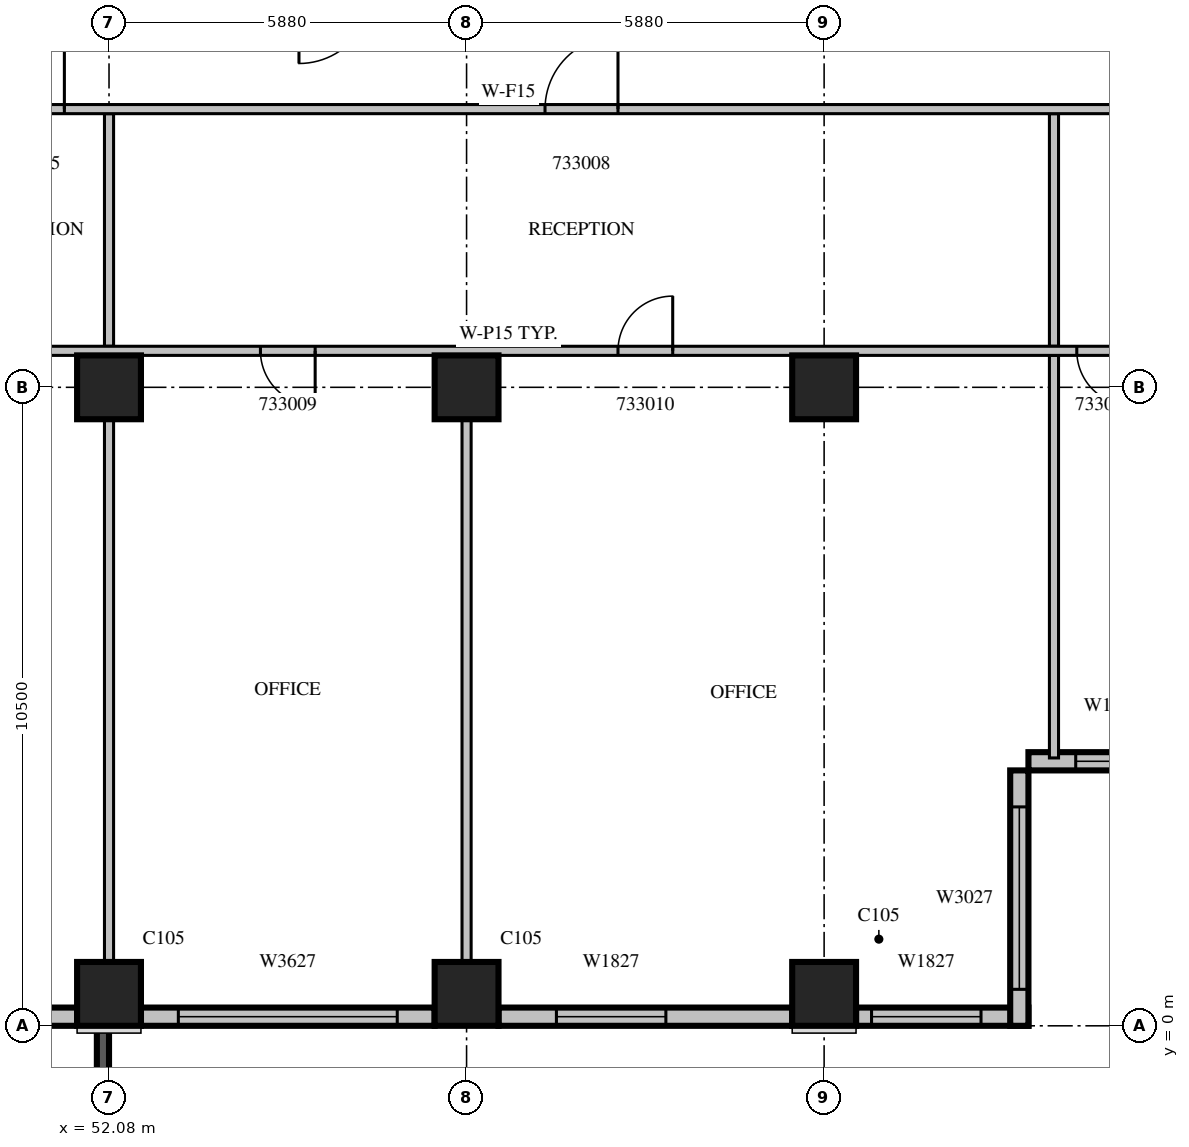
"""IFC4 building model, lengths in metres.
Left out: names, types, materials, properties, quantities, classifications, styles, units other than length and angle.
Written with IfcOpenShell. Run it as: python <this file> out.ifc"""

import sys

from ifc_helpers import new_model, si_unit, direction, frame, frame_2d, origin, origin_2d, place, context, subcontext, project, spatial, rectangle, extrude, source, transform, mapped, element, fill, save


model = new_model("IFC4")
c1 = context("Model", 3, precision=1e-05, world=origin(), true_north=direction((0.0, 1.0)))
c2 = subcontext(c1, "Body", "Model", "MODEL_VIEW")
j1 = project(units=[si_unit("LENGTHUNIT", "METRE"), si_unit("PLANEANGLEUNIT", "RADIAN")], contexts=[c1])
p1 = place(None, origin())
s1 = spatial("IfcSite", under=j1, at=p1, CompositionType="ELEMENT")
p2 = place(p1, origin())
s2 = spatial("IfcBuilding", under=s1, at=p2, CompositionType="ELEMENT")
p3 = place(p2, frame((0.0, 0.0, 149.7)))
s3 = spatial("IfcBuildingStorey", under=s2, at=p3, CompositionType="ELEMENT", Elevation=149.7)
m1 = source(origin(), c2, "Body", "SweptSolid", [
    extrude(rectangle(XDim=1.05, YDim=1.05, at=origin_2d()), origin(), (0.0, 0.0, 1.0), 4.2),
])
for number, where, z_axis, x_axis in (
    (1, (52.08, 0.525, 0.0), (0.0, 0.0, 1.0), (1.0, 0.0, 0.0)),
    (2, (57.96, 0.525, 0.0), (0.0, 0.0, 1.0), (1.0, 0.0, 0.0)),
    (3, (63.84, 0.525, 0.0), (0.0, 0.0, 1.0), (1.0, 0.0, 0.0)),
    (4, (52.08, 10.5, 0.0), (0.0, 0.0, 1.0), (1.0, 0.0, 0.0)),
    (5, (57.96, 10.5, 0.0), (0.0, 0.0, 1.0), (1.0, 0.0, 0.0)),
    (6, (63.84, 10.5, 0.0), (0.0, 0.0, 1.0), (1.0, 0.0, 0.0)),
):
    element("IfcColumn", number, at=place(p3, frame(where, z_axis=z_axis, x_axis=x_axis)), inside=s3, PredefinedType="COLUMN", context=c2, shape_type="MappedRepresentation", body=[
        mapped(m1, transform((0.0, 0.0, 0.0), scale=1.0)),
    ])
m2 = source(origin(), c2, "Body", "SweptSolid", [
    extrude(rectangle(XDim=3.9, YDim=0.2, at=frame_2d((1.95, 0.0))), origin(), (0.0, 0.0, 1.0), 3.8),
])
p4 = place(p3, frame((51.98, 0.0, 0.0), z_axis=(0.0, 0.0, 1.0), x_axis=(0.0, -1.0, 0.0)))
e7 = element("IfcWall", 7, at=p4, inside=s3, PredefinedType="SOLIDWALL", context=c2, shape_type="MappedRepresentation", body=[
    mapped(m2, transform((0.0, 0.0, 0.0), scale=1.0)),
])
m3 = source(origin(), c2, "Body", "SweptSolid", [
    extrude(rectangle(XDim=2.4, YDim=2.7, at=frame_2d((1.2, 1.35))), frame((0.0, 0.11, 0.0), z_axis=(0.0, -1.0, 0.0), x_axis=(1.0, 0.0, 0.0)), (0.0, 0.0, 1.0), 0.22),
])
p5 = place(p4, frame((0.75, 0.0, 0.6)))
e8 = element("IfcOpeningElement", 8, at=p5, cuts=e7, PredefinedType="OPENING", context=c2, shape_type="MappedRepresentation", body=[
    mapped(m3, transform((0.0, 0.0, 0.0), scale=1.0)),
])
m4 = source(origin(), c2, "Body", "SweptSolid", [
    extrude(rectangle(XDim=4.83, YDim=0.3, at=frame_2d((2.415, 0.0))), origin(), (0.0, 0.0, 1.0), 3.8),
])
p6 = place(p3, frame((46.725, 0.15, 0.0), z_axis=(0.0, 0.0, 1.0), x_axis=(1.0, 0.0, 0.0)))
e9 = element("IfcWall", 9, at=p6, inside=s3, PredefinedType="STANDARD", context=c2, shape_type="MappedRepresentation", body=[
    mapped(m4, transform((0.0, 0.0, 0.0), scale=1.0)),
])
m5 = source(origin(), c2, "Body", "SweptSolid", [
    extrude(rectangle(XDim=1.0, YDim=2.1, at=frame_2d((0.5, 1.05))), frame((0.0, 0.16, 0.0), z_axis=(0.0, -1.0, 0.0), x_axis=(1.0, 0.0, 0.0)), (0.0, 0.0, 1.0), 0.32),
])
p7 = place(p6, frame((1.915, 0.0, 0.0)))
e10 = element("IfcOpeningElement", 10, at=p7, cuts=e9, PredefinedType="OPENING", context=c2, shape_type="MappedRepresentation", body=[
    mapped(m5, transform((0.0, 0.0, 0.0), scale=1.0)),
])
p8 = place(p3, frame((52.605, 0.15, 0.0), z_axis=(0.0, 0.0, 1.0), x_axis=(1.0, 0.0, 0.0)))
e11 = element("IfcWall", 11, at=p8, inside=s3, PredefinedType="STANDARD", context=c2, shape_type="MappedRepresentation", body=[
    mapped(m4, transform((0.0, 0.0, 0.0), scale=1.0)),
])
m6 = source(origin(), c2, "Body", "SweptSolid", [
    extrude(rectangle(XDim=3.6, YDim=2.7, at=frame_2d((1.8, 1.35))), frame((0.0, 0.16, 0.0), z_axis=(0.0, -1.0, 0.0), x_axis=(1.0, 0.0, 0.0)), (0.0, 0.0, 1.0), 0.32),
])
p9 = place(p8, frame((0.615, 0.0, 0.6)))
e12 = element("IfcOpeningElement", 12, at=p9, cuts=e11, PredefinedType="OPENING", context=c2, shape_type="MappedRepresentation", body=[
    mapped(m6, transform((0.0, 0.0, 0.0), scale=1.0)),
])
p10 = place(p3, frame((58.485, 0.15, 0.0), z_axis=(0.0, 0.0, 1.0), x_axis=(1.0, 0.0, 0.0)))
e13 = element("IfcWall", 13, at=p10, inside=s3, PredefinedType="STANDARD", context=c2, shape_type="MappedRepresentation", body=[
    mapped(m4, transform((0.0, 0.0, 0.0), scale=1.0)),
])
m7 = source(origin(), c2, "Body", "SweptSolid", [
    extrude(rectangle(XDim=1.8, YDim=2.7, at=frame_2d((0.9, 1.35))), frame((0.0, 0.16, 0.0), z_axis=(0.0, -1.0, 0.0), x_axis=(1.0, 0.0, 0.0)), (0.0, 0.0, 1.0), 0.32),
])
p11 = place(p10, frame((0.953, 0.0, 0.6)))
e14 = element("IfcOpeningElement", 14, at=p11, cuts=e13, PredefinedType="OPENING", context=c2, shape_type="MappedRepresentation", body=[
    mapped(m7, transform((0.0, 0.0, 0.0), scale=1.0)),
])
m8 = source(origin(), c2, "Body", "SweptSolid", [
    extrude(rectangle(XDim=2.835, YDim=0.3, at=frame_2d((1.417, 0.0))), origin(), (0.0, 0.0, 1.0), 3.8),
])
p12 = place(p3, frame((64.365, 0.15, 0.0), z_axis=(0.0, 0.0, 1.0), x_axis=(1.0, 0.0, 0.0)))
e15 = element("IfcWall", 15, at=p12, inside=s3, PredefinedType="STANDARD", context=c2, shape_type="MappedRepresentation", body=[
    mapped(m8, transform((0.0, 0.0, 0.0), scale=1.0)),
])
p13 = place(p12, frame((0.255, 0.0, 0.6)))
e16 = element("IfcOpeningElement", 16, at=p13, cuts=e15, PredefinedType="OPENING", context=c2, shape_type="MappedRepresentation", body=[
    mapped(m7, transform((0.0, 0.0, 0.0), scale=1.0)),
])
m9 = source(origin(), c2, "Body", "SweptSolid", [
    extrude(rectangle(XDim=4.2, YDim=0.3, at=frame_2d((2.1, 0.0))), origin(), (0.0, 0.0, 1.0), 3.8),
])
p14 = place(p3, frame((67.05, 0.0, 0.0), z_axis=(0.0, 0.0, 1.0), x_axis=(0.0, 1.0, 0.0)))
e17 = element("IfcWall", 17, at=p14, inside=s3, PredefinedType="STANDARD", context=c2, shape_type="MappedRepresentation", body=[
    mapped(m9, transform((0.0, 0.0, 0.0), scale=1.0)),
])
m10 = source(origin(), c2, "Body", "SweptSolid", [
    extrude(rectangle(XDim=3.0, YDim=2.7, at=frame_2d((1.5, 1.35))), frame((0.0, 0.16, 0.0), z_axis=(0.0, -1.0, 0.0), x_axis=(1.0, 0.0, 0.0)), (0.0, 0.0, 1.0), 0.32),
])
p15 = place(p14, frame((0.6, 0.0, 0.6)))
e18 = element("IfcOpeningElement", 18, at=p15, cuts=e17, PredefinedType="OPENING", context=c2, shape_type="MappedRepresentation", body=[
    mapped(m10, transform((0.0, 0.0, 0.0), scale=1.0)),
])
m11 = source(origin(), c2, "Body", "SweptSolid", [
    extrude(rectangle(XDim=2.52, YDim=0.3, at=frame_2d((1.26, 0.0))), origin(), (0.0, 0.0, 1.0), 3.8),
])
p16 = place(p3, frame((67.2, 4.35, 0.0), z_axis=(0.0, 0.0, 1.0), x_axis=(1.0, 0.0, 0.0)))
e19 = element("IfcWall", 19, at=p16, inside=s3, PredefinedType="STANDARD", context=c2, shape_type="MappedRepresentation", body=[
    mapped(m11, transform((0.0, 0.0, 0.0), scale=1.0)),
])
m12 = source(origin(), c2, "Body", "SweptSolid", [
    extrude(rectangle(XDim=1.2, YDim=2.7, at=frame_2d((0.6, 1.35))), frame((0.0, 0.16, 0.0), z_axis=(0.0, -1.0, 0.0), x_axis=(1.0, 0.0, 0.0)), (0.0, 0.0, 1.0), 0.32),
])
p17 = place(p16, frame((0.777, 0.0, 0.6)))
e20 = element("IfcOpeningElement", 20, at=p17, cuts=e19, PredefinedType="OPENING", context=c2, shape_type="MappedRepresentation", body=[
    mapped(m12, transform((0.0, 0.0, 0.0), scale=1.0)),
])
m13 = source(origin(), c2, "Body", "SweptSolid", [
    extrude(rectangle(XDim=8.927, YDim=0.15, at=frame_2d((4.463, 0.0))), origin(), (0.0, 0.0, 1.0), 3.8),
])
for number, where, z_axis, x_axis in (
    (21, (57.96, 1.049, 0.0), (0.0, 0.0, 1.0), (0.0, 1.0, 0.0)),
    (22, (52.08, 1.049, 0.0), (0.0, 0.0, 1.0), (0.0, 1.0, 0.0)),
):
    element("IfcWall", number, at=place(p3, frame(where, z_axis=z_axis, x_axis=x_axis)), inside=s3, PredefinedType="PARTITIONING", context=c2, shape_type="MappedRepresentation", body=[
        mapped(m13, transform((0.0, 0.0, 0.0), scale=1.0)),
    ])
m14 = source(origin(), c2, "Body", "SweptSolid", [
    extrude(rectangle(XDim=3.825, YDim=0.15, at=frame_2d((1.913, 0.0))), origin(), (0.0, 0.0, 1.0), 3.8),
])
p18 = place(p3, frame((52.08, 11.175, 0.0), z_axis=(0.0, 0.0, 1.0), x_axis=(0.0, 1.0, 0.0)))
e23 = element("IfcWall", 23, at=p18, inside=s3, PredefinedType="PARTITIONING", context=c2, shape_type="MappedRepresentation", body=[
    mapped(m14, transform((0.0, 0.0, 0.0), scale=1.0)),
])
m15 = source(origin(), c2, "Body", "SweptSolid", [
    extrude(rectangle(XDim=6.62, YDim=0.15, at=frame_2d((3.31, 0.0))), origin(), (0.0, 0.0, 1.0), 3.8),
])
p19 = place(p3, frame((67.62, 4.405, 0.0), z_axis=(0.0, 0.0, 1.0), x_axis=(0.0, 1.0, 0.0)))
e24 = element("IfcWall", 24, at=p19, inside=s3, PredefinedType="PARTITIONING", context=c2, shape_type="MappedRepresentation", body=[
    mapped(m15, transform((0.0, 0.0, 0.0), scale=1.0)),
])
p20 = place(p3, frame((67.62, 11.175, 0.0), z_axis=(0.0, 0.0, 1.0), x_axis=(0.0, 1.0, 0.0)))
e25 = element("IfcWall", 25, at=p20, inside=s3, PredefinedType="PARTITIONING", context=c2, shape_type="MappedRepresentation", body=[
    mapped(m14, transform((0.0, 0.0, 0.0), scale=1.0)),
])
m16 = source(origin(), c2, "Body", "SweptSolid", [
    extrude(rectangle(XDim=24.9, YDim=0.15, at=frame_2d((12.45, 0.0))), origin(), (0.0, 0.0, 1.0), 3.8),
])
p21 = place(p3, frame((71.1, 11.1, 0.0), z_axis=(0.0, 0.0, 1.0), x_axis=(-1.0, 0.0, 0.0)))
e26 = element("IfcWall", 26, at=p21, inside=s3, PredefinedType="PARTITIONING", context=c2, shape_type="MappedRepresentation", body=[
    mapped(m16, transform((0.0, 0.0, 0.0), scale=1.0)),
])
m17 = source(origin(), c2, "Body", "SweptSolid", [
    extrude(rectangle(XDim=1.1, YDim=2.1, at=frame_2d((0.55, 1.05))), frame((0.0, 0.085, 0.0), z_axis=(0.0, -1.0, 0.0), x_axis=(1.0, 0.0, 0.0)), (0.0, 0.0, 1.0), 0.17),
])
p22 = place(p21, frame((19.988, 0.0, 0.0)))
e27 = element("IfcOpeningElement", 27, at=p22, cuts=e26, PredefinedType="OPENING", context=c2, shape_type="MappedRepresentation", body=[
    mapped(m17, transform((0.0, 0.0, 0.0), scale=1.0)),
])
m18 = source(origin(), c2, "Body", "SweptSolid", [
    extrude(rectangle(XDim=0.9, YDim=2.1, at=frame_2d((0.45, 1.05))), frame((0.0, 0.085, 0.0), z_axis=(0.0, -1.0, 0.0), x_axis=(1.0, 0.0, 0.0)), (0.0, 0.0, 1.0), 0.17),
])
p23 = place(p21, frame((15.63, 0.0, 0.0)))
e28 = element("IfcOpeningElement", 28, at=p23, cuts=e26, PredefinedType="OPENING", context=c2, shape_type="MappedRepresentation", body=[
    mapped(m18, transform((0.0, 0.0, 0.0), scale=1.0)),
])
p24 = place(p21, frame((9.75, 0.0, 0.0)))
e29 = element("IfcOpeningElement", 29, at=p24, cuts=e26, PredefinedType="OPENING", context=c2, shape_type="MappedRepresentation", body=[
    mapped(m18, transform((0.0, 0.0, 0.0), scale=1.0)),
])
p25 = place(p21, frame((2.205, 0.0, 0.0)))
e30 = element("IfcOpeningElement", 30, at=p25, cuts=e26, PredefinedType="OPENING", context=c2, shape_type="MappedRepresentation", body=[
    mapped(m18, transform((0.0, 0.0, 0.0), scale=1.0)),
])
p26 = place(p3, frame((71.1, 15.075, 0.0), z_axis=(0.0, 0.0, 1.0), x_axis=(-1.0, 0.0, 0.0)))
e31 = element("IfcWall", 31, at=p26, inside=s3, PredefinedType="PARTITIONING", context=c2, shape_type="MappedRepresentation", body=[
    mapped(m16, transform((0.0, 0.0, 0.0), scale=1.0)),
])
p27 = place(p26, frame((19.754, 0.0, 0.0)))
e32 = element("IfcOpeningElement", 32, at=p27, cuts=e31, PredefinedType="OPENING", context=c2, shape_type="MappedRepresentation", body=[
    mapped(m17, transform((0.0, 0.0, 0.0), scale=1.0)),
])
p28 = place(p26, frame((22.794, 0.0, 0.0)))
e33 = element("IfcOpeningElement", 33, at=p28, cuts=e31, PredefinedType="OPENING", context=c2, shape_type="MappedRepresentation", body=[
    mapped(m18, transform((0.0, 0.0, 0.0), scale=1.0)),
])
m19 = source(origin(), c2, "Body", "SweptSolid", [
    extrude(rectangle(XDim=1.2, YDim=2.1, at=frame_2d((0.6, 1.05))), frame((0.0, 0.085, 0.0), z_axis=(0.0, -1.0, 0.0), x_axis=(1.0, 0.0, 0.0)), (0.0, 0.0, 1.0), 0.17),
])
p29 = place(p26, frame((10.65, 0.0, 0.0)))
e34 = element("IfcOpeningElement", 34, at=p29, cuts=e31, PredefinedType="OPENING", context=c2, shape_type="MappedRepresentation", body=[
    mapped(m19, transform((0.0, 0.0, 0.0), scale=1.0)),
])
p30 = place(p26, frame((1.103, 0.0, 0.0)))
e35 = element("IfcOpeningElement", 35, at=p30, cuts=e31, PredefinedType="OPENING", context=c2, shape_type="MappedRepresentation", body=[
    mapped(m19, transform((0.0, 0.0, 0.0), scale=1.0)),
])
m20 = source(origin(), c2, "Body", "SweptSolid", [
    extrude(rectangle(XDim=3.6, YDim=2.7, at=frame_2d((1.8, 1.35))), frame((0.0, 0.03, 0.0), z_axis=(0.0, -1.0, 0.0), x_axis=(1.0, 0.0, 0.0)), (0.0, 0.0, 1.0), 0.06),
])
p31 = place(p9, origin())
e36 = element("IfcWindow", 36, at=p31, inside=s3, PartitioningType="SINGLE_PANEL", PredefinedType="WINDOW", context=c2, shape_type="MappedRepresentation", body=[
    mapped(m20, transform((0.0, 0.0, 0.0), scale=1.0)),
])
fill(e12, e36)
m21 = source(origin(), c2, "Body", "SweptSolid", [
    extrude(rectangle(XDim=1.8, YDim=2.7, at=frame_2d((0.9, 1.35))), frame((0.0, 0.03, 0.0), z_axis=(0.0, -1.0, 0.0), x_axis=(1.0, 0.0, 0.0)), (0.0, 0.0, 1.0), 0.06),
])
p32 = place(p11, origin())
e37 = element("IfcWindow", 37, at=p32, inside=s3, PartitioningType="SINGLE_PANEL", PredefinedType="WINDOW", context=c2, shape_type="MappedRepresentation", body=[
    mapped(m21, transform((0.0, 0.0, 0.0), scale=1.0)),
])
fill(e14, e37)
p33 = place(p13, origin())
e38 = element("IfcWindow", 38, at=p33, inside=s3, PartitioningType="SINGLE_PANEL", PredefinedType="WINDOW", context=c2, shape_type="MappedRepresentation", body=[
    mapped(m21, transform((0.0, 0.0, 0.0), scale=1.0)),
])
fill(e16, e38)
m22 = source(origin(), c2, "Body", "SweptSolid", [
    extrude(rectangle(XDim=3.0, YDim=2.7, at=frame_2d((1.5, 1.35))), frame((0.0, 0.03, 0.0), z_axis=(0.0, -1.0, 0.0), x_axis=(1.0, 0.0, 0.0)), (0.0, 0.0, 1.0), 0.06),
])
p34 = place(p15, origin())
e39 = element("IfcWindow", 39, at=p34, inside=s3, PartitioningType="SINGLE_PANEL", PredefinedType="WINDOW", context=c2, shape_type="MappedRepresentation", body=[
    mapped(m22, transform((0.0, 0.0, 0.0), scale=1.0)),
])
fill(e18, e39)
m23 = source(origin(), c2, "Body", "SweptSolid", [
    extrude(rectangle(XDim=1.2, YDim=2.7, at=frame_2d((0.6, 1.35))), frame((0.0, 0.03, 0.0), z_axis=(0.0, -1.0, 0.0), x_axis=(1.0, 0.0, 0.0)), (0.0, 0.0, 1.0), 0.06),
])
p35 = place(p17, origin())
e40 = element("IfcWindow", 40, at=p35, inside=s3, PartitioningType="SINGLE_PANEL", PredefinedType="WINDOW", context=c2, shape_type="MappedRepresentation", body=[
    mapped(m23, transform((0.0, 0.0, 0.0), scale=1.0)),
])
fill(e20, e40)
m24 = source(origin(), c2, "Body", "SweptSolid", [
    extrude(rectangle(XDim=1.1, YDim=2.1, at=frame_2d((0.55, 1.05))), frame((0.0, 0.025, 0.0), z_axis=(0.0, -1.0, 0.0), x_axis=(1.0, 0.0, 0.0)), (0.0, 0.0, 1.0), 0.05),
])
p36 = place(p27, origin())
e41 = element("IfcDoor", 41, at=p36, inside=s3, OperationType="SINGLE_SWING_RIGHT", PredefinedType="DOOR", context=c2, shape_type="MappedRepresentation", body=[
    mapped(m24, transform((0.0, 0.0, 0.0), scale=1.0)),
])
fill(e32, e41)
m25 = source(origin(), c2, "Body", "SweptSolid", [
    extrude(rectangle(XDim=1.2, YDim=2.1, at=frame_2d((0.6, 1.05))), frame((0.0, 0.025, 0.0), z_axis=(0.0, -1.0, 0.0), x_axis=(1.0, 0.0, 0.0)), (0.0, 0.0, 1.0), 0.05),
])
p37 = place(p29, origin())
e42 = element("IfcDoor", 42, at=p37, inside=s3, OperationType="SINGLE_SWING_RIGHT", PredefinedType="DOOR", context=c2, shape_type="MappedRepresentation", body=[
    mapped(m25, transform((0.0, 0.0, 0.0), scale=1.0)),
])
fill(e34, e42)
m26 = source(origin(), c2, "Body", "SweptSolid", [
    extrude(rectangle(XDim=0.9, YDim=2.1, at=frame_2d((0.45, 1.05))), frame((0.0, 0.025, 0.0), z_axis=(0.0, -1.0, 0.0), x_axis=(1.0, 0.0, 0.0)), (0.0, 0.0, 1.0), 0.05),
])
p38 = place(p23, origin())
e43 = element("IfcDoor", 43, at=p38, inside=s3, OperationType="SINGLE_SWING_LEFT", PredefinedType="DOOR", context=c2, shape_type="MappedRepresentation", body=[
    mapped(m26, transform((0.0, 0.0, 0.0), scale=1.0)),
])
fill(e28, e43)
p39 = place(p24, origin())
e44 = element("IfcDoor", 44, at=p39, inside=s3, OperationType="SINGLE_SWING_RIGHT", PredefinedType="DOOR", context=c2, shape_type="MappedRepresentation", body=[
    mapped(m26, transform((0.0, 0.0, 0.0), scale=1.0)),
])
fill(e29, e44)
p40 = place(p25, origin())
e45 = element("IfcDoor", 45, at=p40, inside=s3, OperationType="SINGLE_SWING_LEFT", PredefinedType="DOOR", context=c2, shape_type="MappedRepresentation", body=[
    mapped(m26, transform((0.0, 0.0, 0.0), scale=1.0)),
])
fill(e30, e45)
save(model, sys.argv[1])
